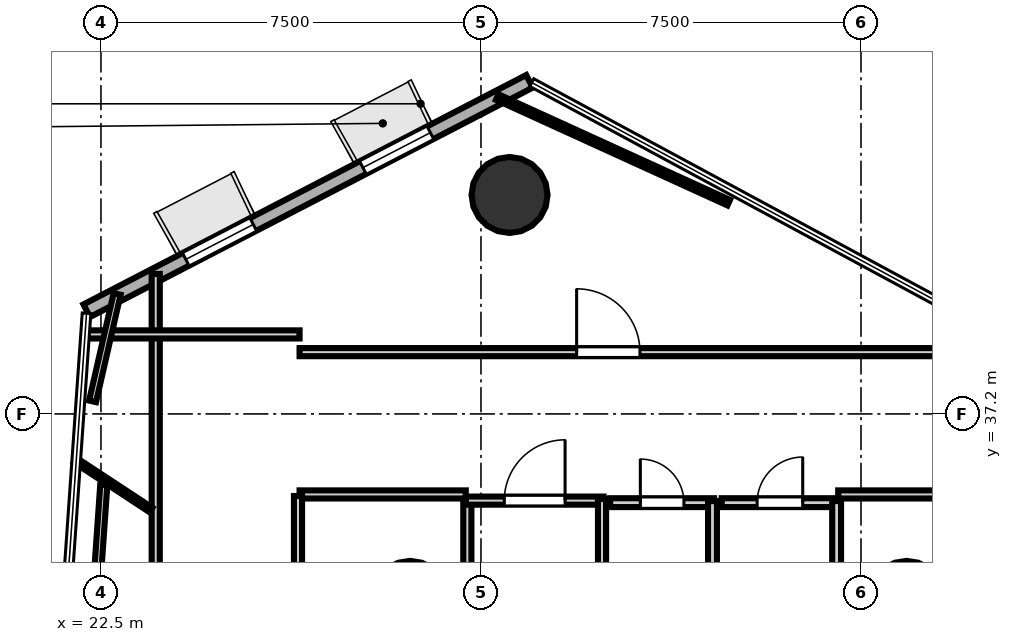
"""IFC4 building model, lengths in metres.
Left out: names, types, materials, properties, quantities, classifications, styles, units other than length and angle.
Written with IfcOpenShell. Run it as: python <this file> out.ifc"""

import sys

from ifc_helpers import new_model, si_unit, direction, frame, frame_2d, origin, origin_2d, place, context, subcontext, project, spatial, rectangle, hollow_circle, extrude, element, fill, save


model = new_model("IFC4")
c1 = context("Model", 3, precision=1e-05, world=origin(), true_north=direction((0.0, 1.0)))
c2 = subcontext(c1, "Body", "Model", "MODEL_VIEW")
j1 = project(units=[si_unit("LENGTHUNIT", "METRE"), si_unit("PLANEANGLEUNIT", "RADIAN")], contexts=[c1])
p1 = place(None, origin())
s1 = spatial("IfcSite", under=j1, at=p1, CompositionType="ELEMENT")
p2 = place(p1, origin())
s2 = spatial("IfcBuilding", under=s1, at=p2, CompositionType="ELEMENT")
p3 = place(p2, frame((0.0, 0.0, 127.4)))
s3 = spatial("IfcBuildingStorey", under=s2, at=p3, CompositionType="ELEMENT", Elevation=127.4)
for number, where, z_axis, x_axis in (
    (1, (28.6, 33.55, 0.0), (0.0, 0.0, 1.0), (1.0, 0.0, 0.0)),
    (2, (38.4, 33.55, 0.0), (0.0, 0.0, 1.0), (1.0, 0.0, 0.0)),
    (3, (30.564, 41.521, 0.0), (0.0, 0.0, 1.0), (1.0, 0.0, 0.0)),
):
    element("IfcColumn", number, at=place(p3, frame(where, z_axis=z_axis, x_axis=x_axis)), inside=s3, PredefinedType="COLUMN", context=c2, shape_type="SweptSolid", body=[
        extrude(hollow_circle(Radius=0.75, WallThickness=0.036, at=origin_2d()), origin(), (0.0, 0.0, 1.0), 3.7),
    ])
p4 = place(p3, frame((30.957, 43.763, 0.0), z_axis=(0.0, 0.0, 1.0), x_axis=(-0.887929817934, -0.459978954327, 0.0)))
e4 = element("IfcWall", 4, at=p4, inside=s3, PredefinedType="SOLIDWALL", context=c2, shape_type="SweptSolid", body=[
    extrude(rectangle(XDim=9.841, YDim=0.28, at=frame_2d((4.92, 0.0))), origin(), (0.0, 0.0, 1.0), 3.52),
])
p5 = place(p4, frame((2.202, 0.0, 0.85)))
e5 = element("IfcOpeningElement", 5, at=p5, cuts=e4, PredefinedType="OPENING", context=c2, shape_type="SweptSolid", body=[
    extrude(rectangle(XDim=1.5, YDim=2.1, at=frame_2d((0.75, 1.05))), frame((0.0, 0.15, 0.0), z_axis=(0.0, -1.0, 0.0), x_axis=(1.0, 0.0, 0.0)), (0.0, 0.0, 1.0), 0.3),
])
p6 = place(p4, frame((6.139, 0.0, 0.85)))
e6 = element("IfcOpeningElement", 6, at=p6, cuts=e4, PredefinedType="OPENING", context=c2, shape_type="SweptSolid", body=[
    extrude(rectangle(XDim=1.5, YDim=2.1, at=frame_2d((0.75, 1.05))), frame((0.0, 0.15, 0.0), z_axis=(0.0, -1.0, 0.0), x_axis=(1.0, 0.0, 0.0)), (0.0, 0.0, 1.0), 0.3),
])
p7 = place(p3, frame((29.731, 32.958, 0.0), z_axis=(0.0, 0.0, 1.0), x_axis=(0.0, 1.0, 0.0)))
e7 = element("IfcWall", 7, at=p7, inside=s3, PredefinedType="PARTITIONING", context=c2, shape_type="SweptSolid", body=[
    extrude(rectangle(XDim=2.562, YDim=0.16, at=frame_2d((1.281, 0.0))), origin(), (0.0, 0.0, 1.0), 2.84),
])
p8 = place(p3, frame((29.7, 35.489, 0.0), z_axis=(0.0, 0.0, 1.0), x_axis=(1.0, 0.0, 0.0)))
e8 = element("IfcWall", 8, at=p8, inside=s3, PredefinedType="PARTITIONING", context=c2, shape_type="SweptSolid", body=[
    extrude(rectangle(XDim=2.72, YDim=0.16, at=frame_2d((1.36, 0.0))), origin(), (0.0, 0.0, 1.0), 2.84),
])
p9 = place(p8, frame((0.76, 0.0, 0.0)))
e9 = element("IfcOpeningElement", 9, at=p9, cuts=e8, PredefinedType="OPENING", context=c2, shape_type="SweptSolid", body=[
    extrude(rectangle(XDim=1.2, YDim=2.15, at=frame_2d((0.6, 1.075))), frame((0.0, 0.09, 0.0), z_axis=(0.0, -1.0, 0.0), x_axis=(1.0, 0.0, 0.0)), (0.0, 0.0, 1.0), 0.18),
])
p10 = place(p3, frame((32.389, 35.52, 0.0), z_axis=(0.0, 0.0, 1.0), x_axis=(0.0, -1.0, 0.0)))
e10 = element("IfcWall", 10, at=p10, inside=s3, PredefinedType="PARTITIONING", context=c2, shape_type="SweptSolid", body=[
    extrude(rectangle(XDim=2.562, YDim=0.16, at=frame_2d((1.281, 0.0))), origin(), (0.0, 0.0, 1.0), 2.84),
])
p11 = place(p3, frame((32.55, 35.449, 0.0), z_axis=(0.0, 0.0, 1.0), x_axis=(1.0, 0.0, 0.0)))
e11 = element("IfcWall", 11, at=p11, inside=s3, PredefinedType="PLUMBINGWALL", context=c2, shape_type="SweptSolid", body=[
    extrude(rectangle(XDim=2.05, YDim=0.175, at=frame_2d((1.025, 0.0))), origin(), (0.0, 0.0, 1.0), 2.84),
])
p12 = place(p11, frame((0.595, 0.0, 0.0)))
e12 = element("IfcOpeningElement", 12, at=p12, cuts=e11, PredefinedType="OPENING", context=c2, shape_type="SweptSolid", body=[
    extrude(rectangle(XDim=0.86, YDim=2.05, at=frame_2d((0.43, 1.025))), frame((0.0, 0.097, 0.0), z_axis=(0.0, -1.0, 0.0), x_axis=(1.0, 0.0, 0.0)), (0.0, 0.0, 1.0), 0.195),
])
p13 = place(p3, frame((34.569, 35.48, 0.0), z_axis=(0.0, 0.0, 1.0), x_axis=(0.0, -1.0, 0.0)))
e13 = element("IfcWall", 13, at=p13, inside=s3, PredefinedType="PLUMBINGWALL", context=c2, shape_type="SweptSolid", body=[
    extrude(rectangle(XDim=2.522, YDim=0.175, at=frame_2d((1.261, 0.0))), origin(), (0.0, 0.0, 1.0), 2.84),
])
p14 = place(p3, frame((34.75, 35.449, 0.0), z_axis=(0.0, 0.0, 1.0), x_axis=(1.0, 0.0, 0.0)))
e14 = element("IfcWall", 14, at=p14, inside=s3, PredefinedType="PLUMBINGWALL", context=c2, shape_type="SweptSolid", body=[
    extrude(rectangle(XDim=2.3, YDim=0.175, at=frame_2d((1.15, 0.0))), origin(), (0.0, 0.0, 1.0), 2.84),
])
p15 = place(p14, frame((0.7, 0.0, 0.0)))
e15 = element("IfcOpeningElement", 15, at=p15, cuts=e14, PredefinedType="OPENING", context=c2, shape_type="SweptSolid", body=[
    extrude(rectangle(XDim=0.9, YDim=2.1, at=frame_2d((0.45, 1.05))), frame((0.0, 0.097, 0.0), z_axis=(0.0, -1.0, 0.0), x_axis=(1.0, 0.0, 0.0)), (0.0, 0.0, 1.0), 0.195),
])
p16 = place(p3, frame((37.019, 35.48, 0.0), z_axis=(0.0, 0.0, 1.0), x_axis=(0.0, -1.0, 0.0)))
e16 = element("IfcWall", 16, at=p16, inside=s3, PredefinedType="PLUMBINGWALL", context=c2, shape_type="SweptSolid", body=[
    extrude(rectangle(XDim=2.522, YDim=0.175, at=frame_2d((1.261, 0.0))), origin(), (0.0, 0.0, 1.0), 2.84),
])
p17 = place(p3, frame((23.581, 28.307, 0.0), z_axis=(0.0, 0.0, 1.0), x_axis=(0.0, 1.0, 0.0)))
e17 = element("IfcWall", 17, at=p17, inside=s3, PredefinedType="PARTITIONING", context=c2, shape_type="SweptSolid", body=[
    extrude(rectangle(XDim=11.656, YDim=0.16, at=frame_2d((5.828, 0.0))), origin(), (0.0, 0.0, 1.0), 2.84),
])
p18 = place(p17, frame((3.223, 0.0, 0.0)))
e18 = element("IfcOpeningElement", 18, at=p18, cuts=e17, PredefinedType="OPENING", context=c2, shape_type="SweptSolid", body=[
    extrude(rectangle(XDim=1.25, YDim=2.2, at=frame_2d((0.625, 1.1))), frame((0.0, 0.09, 0.0), z_axis=(0.0, -1.0, 0.0), x_axis=(1.0, 0.0, 0.0)), (0.0, 0.0, 1.0), 0.18),
])
p19 = place(p3, frame((22.166, 38.769, 0.0), z_axis=(0.0, 0.0, 1.0), x_axis=(1.0, 0.0, 0.0)))
e19 = element("IfcWall", 19, at=p19, inside=s3, PredefinedType="PARTITIONING", context=c2, shape_type="SweptSolid", body=[
    extrude(rectangle(XDim=4.254, YDim=0.16, at=frame_2d((2.127, 0.0))), origin(), (0.0, 0.0, 1.0), 2.84),
])
p20 = place(p3, frame((26.42, 38.419, 0.0), z_axis=(0.0, 0.0, 1.0), x_axis=(1.0, 0.0, 0.0)))
e20 = element("IfcWall", 20, at=p20, inside=s3, PredefinedType="PARTITIONING", context=c2, shape_type="SweptSolid", body=[
    extrude(rectangle(XDim=14.461, YDim=0.16, at=frame_2d((7.23, 0.0))), origin(), (0.0, 0.0, 1.0), 2.84),
])
p21 = place(p20, frame((5.468, 0.0, 0.0)))
e21 = element("IfcOpeningElement", 21, at=p21, cuts=e20, PredefinedType="OPENING", context=c2, shape_type="SweptSolid", body=[
    extrude(rectangle(XDim=1.25, YDim=2.2, at=frame_2d((0.625, 1.1))), frame((0.0, 0.09, 0.0), z_axis=(0.0, -1.0, 0.0), x_axis=(1.0, 0.0, 0.0)), (0.0, 0.0, 1.0), 0.18),
])
p22 = place(p3, frame((39.818, 35.611, 0.0), z_axis=(0.0, 0.0, 1.0), x_axis=(-1.0, 0.0, 0.0)))
e22 = element("IfcWall", 22, at=p22, inside=s3, PredefinedType="PARTITIONING", context=c2, shape_type="SweptSolid", body=[
    extrude(rectangle(XDim=2.768, YDim=0.16, at=frame_2d((1.384, 0.0))), origin(), (0.0, 0.0, 1.0), 2.84),
])
p23 = place(p3, frame((29.7, 35.611, 0.0), z_axis=(0.0, 0.0, 1.0), x_axis=(-1.0, 0.0, 0.0)))
e23 = element("IfcWall", 23, at=p23, inside=s3, PredefinedType="PARTITIONING", context=c2, shape_type="SweptSolid", body=[
    extrude(rectangle(XDim=3.28, YDim=0.16, at=frame_2d((1.64, 0.0))), origin(), (0.0, 0.0, 1.0), 2.84),
])
p24 = place(p3, frame((26.389, 35.58, 0.0), z_axis=(0.0, 0.0, 1.0), x_axis=(0.0, -1.0, 0.0)))
e24 = element("IfcWall", 24, at=p24, inside=s3, PredefinedType="PARTITIONING", context=c2, shape_type="SweptSolid", body=[
    extrude(rectangle(XDim=2.71, YDim=0.16, at=frame_2d((1.355, 0.0))), origin(), (0.0, 0.0, 1.0), 2.84),
])
p25 = place(p3, frame((30.321, 43.452, 0.0), z_axis=(0.0, 0.0, 1.0), x_axis=(0.909842881597, -0.414952926013, 0.0)))
e25 = element("IfcWall", 25, at=p25, inside=s3, PredefinedType="PARTITIONING", context=c2, shape_type="SweptSolid", body=[
    extrude(rectangle(XDim=5.021, YDim=0.12, at=frame_2d((2.51, 0.0))), origin(), (0.0, 0.0, 1.0), 2.84),
])
p26 = place(p3, frame((23.487, 35.305, 0.0), z_axis=(0.0, 0.0, 1.0), x_axis=(-0.835441859879, 0.549578837623, 0.0)))
e26 = element("IfcWall", 26, at=p26, inside=s3, PredefinedType="PARTITIONING", context=c2, shape_type="SweptSolid", body=[
    extrude(rectangle(XDim=1.786, YDim=0.105, at=frame_2d((0.893, 0.0))), origin(), (0.0, 0.0, 1.0), 2.84),
])
p27 = place(p3, frame((22.334, 37.448, 0.0), z_axis=(0.0, 0.0, 1.0), x_axis=(0.223062674573, 0.974804105045, 0.0)))
e27 = element("IfcWall", 27, at=p27, inside=s3, PredefinedType="PARTITIONING", context=c2, shape_type="SweptSolid", body=[
    extrude(rectangle(XDim=2.174, YDim=0.14, at=frame_2d((1.087, 0.0))), origin(), (0.0, 0.0, 1.0), 2.84),
])
p28 = place(p3, frame((21.675, 23.205, 0.0), z_axis=(0.0, 0.0, 1.0), x_axis=(0.069755805167, 0.997564097011, 0.0)))
e28 = element("IfcWall", 28, at=p28, inside=s3, PredefinedType="PARTITIONING", context=c2, shape_type="SweptSolid", body=[
    extrude(rectangle(XDim=12.624, YDim=0.14, at=frame_2d((6.312, 0.0))), origin(), (0.0, 0.0, 1.0), 2.84),
])
p29 = place(p9, origin())
e29 = element("IfcDoor", 29, at=p29, inside=s3, OperationType="SINGLE_SWING_RIGHT", PredefinedType="DOOR", context=c2, shape_type="SweptSolid", body=[
    extrude(rectangle(XDim=1.2, YDim=2.15, at=frame_2d((0.6, 1.075))), frame((0.0, 0.025, 0.0), z_axis=(0.0, -1.0, 0.0), x_axis=(1.0, 0.0, 0.0)), (0.0, 0.0, 1.0), 0.05),
])
fill(e9, e29)
p30 = place(p12, origin())
e30 = element("IfcDoor", 30, at=p30, inside=s3, OperationType="SINGLE_SWING_LEFT", PredefinedType="DOOR", context=c2, shape_type="SweptSolid", body=[
    extrude(rectangle(XDim=0.86, YDim=2.05, at=frame_2d((0.43, 1.025))), frame((0.0, 0.025, 0.0), z_axis=(0.0, -1.0, 0.0), x_axis=(1.0, 0.0, 0.0)), (0.0, 0.0, 1.0), 0.05),
])
fill(e12, e30)
p31 = place(p15, origin())
e31 = element("IfcDoor", 31, at=p31, inside=s3, OperationType="SINGLE_SWING_RIGHT", PredefinedType="DOOR", context=c2, shape_type="SweptSolid", body=[
    extrude(rectangle(XDim=0.9, YDim=2.1, at=frame_2d((0.45, 1.05))), frame((0.0, 0.025, 0.0), z_axis=(0.0, -1.0, 0.0), x_axis=(1.0, 0.0, 0.0)), (0.0, 0.0, 1.0), 0.05),
])
fill(e15, e31)
p32 = place(p21, origin())
e32 = element("IfcDoor", 32, at=p32, inside=s3, OperationType="SINGLE_SWING_LEFT", PredefinedType="DOOR", context=c2, shape_type="SweptSolid", body=[
    extrude(rectangle(XDim=1.25, YDim=2.2, at=frame_2d((0.625, 1.1))), frame((0.0, 0.025, 0.0), z_axis=(0.0, -1.0, 0.0), x_axis=(1.0, 0.0, 0.0)), (0.0, 0.0, 1.0), 0.05),
])
fill(e21, e32)
p33 = place(p5, origin())
e33 = element("IfcWindow", 33, at=p33, inside=s3, PartitioningType="SINGLE_PANEL", PredefinedType="WINDOW", context=c2, shape_type="SweptSolid", body=[
    extrude(rectangle(XDim=1.5, YDim=2.1, at=frame_2d((0.75, 1.05))), frame((0.0, 0.03, 0.0), z_axis=(0.0, -1.0, 0.0), x_axis=(1.0, 0.0, 0.0)), (0.0, 0.0, 1.0), 0.06),
])
fill(e5, e33)
p34 = place(p6, origin())
e34 = element("IfcWindow", 34, at=p34, inside=s3, PartitioningType="SINGLE_PANEL", PredefinedType="WINDOW", context=c2, shape_type="SweptSolid", body=[
    extrude(rectangle(XDim=1.5, YDim=2.1, at=frame_2d((0.75, 1.05))), frame((0.0, 0.03, 0.0), z_axis=(0.0, -1.0, 0.0), x_axis=(1.0, 0.0, 0.0)), (0.0, 0.0, 1.0), 0.06),
])
fill(e6, e34)
save(model, sys.argv[1])
